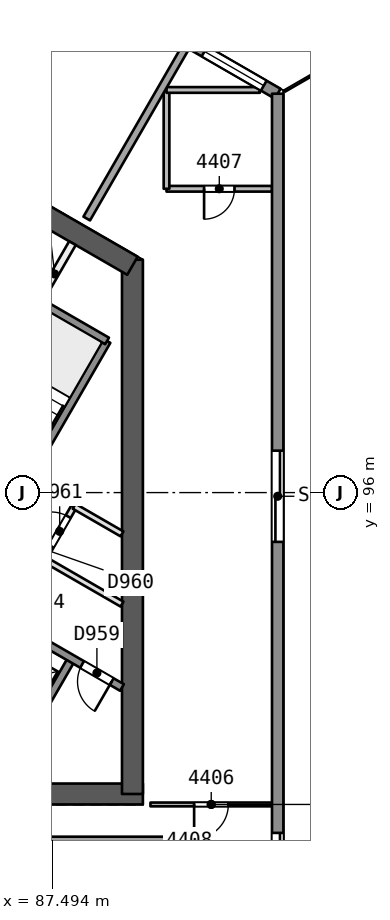
"""IFC4 building model, lengths in metres.
Left out: names, types, materials, properties, quantities, classifications, styles, units other than length and angle.
Written with IfcOpenShell. Run it as: python <this file> out.ifc"""

import sys

from ifc_helpers import new_model, si_unit, direction, frame, frame_2d, origin, place, context, subcontext, project, spatial, rectangle, extrude, element, fill, save


model = new_model("IFC4")
c1 = context("Model", 3, precision=1e-05, world=origin(), true_north=direction((0.0, 1.0)))
c2 = subcontext(c1, "Body", "Model", "MODEL_VIEW")
j1 = project(units=[si_unit("LENGTHUNIT", "METRE"), si_unit("PLANEANGLEUNIT", "RADIAN")], contexts=[c1])
p1 = place(None, origin())
s1 = spatial("IfcSite", under=j1, at=p1, CompositionType="ELEMENT")
p2 = place(p1, origin())
s2 = spatial("IfcBuilding", under=s1, at=p2, CompositionType="ELEMENT")
p3 = place(p2, frame((0.0, 0.0, 182.2)))
s3 = spatial("IfcBuildingStorey", under=s2, at=p3, CompositionType="ELEMENT", Elevation=182.2)
p4 = place(p3, frame((79.659, 88.069, 0.0), z_axis=(0.0, 0.0, 1.0), x_axis=(1.0, 0.0, 0.0)))
e1 = element("IfcWall", 1, at=p4, inside=s3, PredefinedType="SHEAR", context=c2, shape_type="SweptSolid", body=[
    extrude(rectangle(XDim=10.221, YDim=0.55, at=frame_2d((5.111, 0.0))), origin(), (0.0, 0.0, 1.0), 3.7),
])
p5 = place(p4, frame((0.791, 0.0, 0.0)))
e2 = element("IfcOpeningElement", 2, at=p5, cuts=e1, PredefinedType="OPENING", context=c2, shape_type="SweptSolid", body=[
    extrude(rectangle(XDim=1.2, YDim=2.1, at=frame_2d((0.6, 1.05))), frame((0.0, 0.286, 0.0), z_axis=(0.0, -1.0, 0.0), x_axis=(1.0, 0.0, 0.0)), (0.0, 0.0, 1.0), 0.571),
])
p6 = place(p3, frame((89.605, 88.069, 0.0), z_axis=(0.0, 0.0, 1.0), x_axis=(0.0, 1.0, 0.0)))
e3 = element("IfcWall", 3, at=p6, inside=s3, PredefinedType="SHEAR", context=c2, shape_type="SweptSolid", body=[
    extrude(rectangle(XDim=14.058, YDim=0.55, at=frame_2d((7.029, 0.0))), origin(), (0.0, 0.0, 1.0), 3.7),
])
p7 = place(p3, frame((89.605, 101.969, 0.0), z_axis=(0.0, 0.0, 1.0), x_axis=(-0.865997833373, 0.500047750313, 0.0)))
e4 = element("IfcWall", 4, at=p7, inside=s3, PredefinedType="SHEAR", context=c2, shape_type="SweptSolid", body=[
    extrude(rectangle(XDim=3.487, YDim=0.55, at=frame_2d((1.743, 0.0))), origin(), (0.0, 0.0, 1.0), 3.7),
])
p8 = place(p3, frame((93.278, 87.794, 0.0), z_axis=(0.0, 0.0, 1.0), x_axis=(-1.0, 0.0, 0.0)))
e5 = element("IfcWall", 5, at=p8, inside=s3, PredefinedType="PARTITIONING", context=c2, shape_type="SweptSolid", body=[
    extrude(rectangle(XDim=3.199, YDim=0.1, at=frame_2d((1.6, 0.0))), origin(), (0.0, 0.0, 1.0), 3.25),
])
p9 = place(p8, frame((1.15, 0.0, 0.0)))
e6 = element("IfcOpeningElement", 6, at=p9, cuts=e5, PredefinedType="OPENING", context=c2, shape_type="SweptSolid", body=[
    extrude(rectangle(XDim=0.9, YDim=2.1, at=frame_2d((0.45, 1.05))), frame((0.0, 0.061, 0.0), z_axis=(0.0, -1.0, 0.0), x_axis=(1.0, 0.0, 0.0)), (0.0, 0.0, 1.0), 0.121),
])
p10 = place(p3, frame((82.1, 86.846, 0.0), z_axis=(0.0, 0.0, 1.0), x_axis=(1.0, 0.0, 0.0)))
e7 = element("IfcWall", 7, at=p10, inside=s3, PredefinedType="PARTITIONING", context=c2, shape_type="SweptSolid", body=[
    extrude(rectangle(XDim=9.0, YDim=0.2, at=frame_2d((4.5, 0.0))), origin(), (0.0, 0.0, 1.0), 3.25),
])
p11 = place(p3, frame((91.1, 86.846, 0.0), z_axis=(0.0, 0.0, 1.0), x_axis=(0.0, -1.0, 0.0)))
e8 = element("IfcWall", 8, at=p11, inside=s3, PredefinedType="PARTITIONING", context=c2, shape_type="SweptSolid", body=[
    extrude(rectangle(XDim=2.0, YDim=0.2, at=frame_2d((1.0, 0.0))), origin(), (0.0, 0.0, 1.0), 3.25),
])
p12 = place(p11, frame((0.55, 0.0, 0.0)))
e9 = element("IfcOpeningElement", 9, at=p12, cuts=e8, PredefinedType="OPENING", context=c2, shape_type="SweptSolid", body=[
    extrude(rectangle(XDim=0.9, YDim=2.1, at=frame_2d((0.45, 1.05))), frame((0.0, 0.11, 0.0), z_axis=(0.0, -1.0, 0.0), x_axis=(1.0, 0.0, 0.0)), (0.0, 0.0, 1.0), 0.221),
])
p13 = place(p3, frame((93.278, 103.994, 0.0), z_axis=(0.0, 0.0, 1.0), x_axis=(-1.0, 0.0, 0.0)))
e10 = element("IfcWall", 10, at=p13, inside=s3, PredefinedType="PARTITIONING", context=c2, shape_type="SweptSolid", body=[
    extrude(rectangle(XDim=2.777, YDim=0.15, at=frame_2d((1.388, 0.0))), origin(), (0.0, 0.0, 1.0), 3.25),
])
p14 = place(p13, frame((0.988, 0.0, 0.0)))
e11 = element("IfcOpeningElement", 11, at=p14, cuts=e10, PredefinedType="OPENING", context=c2, shape_type="SweptSolid", body=[
    extrude(rectangle(XDim=0.8, YDim=2.1, at=frame_2d((0.4, 1.05))), frame((0.0, 0.085, 0.0), z_axis=(0.0, -1.0, 0.0), x_axis=(1.0, 0.0, 0.0)), (0.0, 0.0, 1.0), 0.171),
])
p15 = place(p3, frame((90.501, 103.994, 0.0), z_axis=(0.0, 0.0, 1.0), x_axis=(0.0, 1.0, 0.0)))
e12 = element("IfcWall", 12, at=p15, inside=s3, PredefinedType="PARTITIONING", context=c2, shape_type="SweptSolid", body=[
    extrude(rectangle(XDim=2.6, YDim=0.15, at=frame_2d((1.3, 0.0))), origin(), (0.0, 0.0, 1.0), 3.25),
])
p16 = place(p3, frame((90.501, 106.594, 0.0), z_axis=(0.0, 0.0, 1.0), x_axis=(1.0, 0.0, 0.0)))
e13 = element("IfcWall", 13, at=p16, inside=s3, PredefinedType="PARTITIONING", context=c2, shape_type="SweptSolid", body=[
    extrude(rectangle(XDim=2.457, YDim=0.15, at=frame_2d((1.229, 0.0))), origin(), (0.0, 0.0, 1.0), 3.25),
])
p17 = place(p3, frame((91.006, 107.721, 0.0), z_axis=(0.0, 0.0, 1.0), x_axis=(-0.500015953014, -0.866016193112, 0.0)))
e14 = element("IfcWall", 14, at=p17, inside=s3, PredefinedType="PARTITIONING", context=c2, shape_type="SweptSolid", body=[
    extrude(rectangle(XDim=5.208, YDim=0.2, at=frame_2d((2.604, 0.0))), origin(), (0.0, 0.0, 1.0), 3.25),
])
p18 = place(p3, frame((88.732, 109.206, 0.0), z_axis=(0.0, 0.0, 1.0), x_axis=(0.866006352826, -0.500032995777, 0.0)))
e15 = element("IfcWall", 15, at=p18, inside=s3, PredefinedType="SOLIDWALL", context=c2, shape_type="SweptSolid", body=[
    extrude(rectangle(XDim=5.422, YDim=0.3, at=frame_2d((2.711, 0.0))), origin(), (0.0, 0.0, 1.0), 3.25),
])
p19 = place(p18, frame((3.198, 0.0, 0.9)))
e16 = element("IfcOpeningElement", 16, at=p19, cuts=e15, PredefinedType="OPENING", context=c2, shape_type="SweptSolid", body=[
    extrude(rectangle(XDim=1.8, YDim=1.5, at=frame_2d((0.9, 0.75))), frame((0.0, 0.161, 0.0), z_axis=(0.0, -1.0, 0.0), x_axis=(1.0, 0.0, 0.0)), (0.0, 0.0, 1.0), 0.321),
])
p20 = place(p18, frame((0.413, 0.0, 0.9)))
e17 = element("IfcOpeningElement", 17, at=p20, cuts=e15, PredefinedType="OPENING", context=c2, shape_type="SweptSolid", body=[
    extrude(rectangle(XDim=1.8, YDim=1.5, at=frame_2d((0.9, 0.75))), frame((0.0, 0.161, 0.0), z_axis=(0.0, -1.0, 0.0), x_axis=(1.0, 0.0, 0.0)), (0.0, 0.0, 1.0), 0.321),
])
p21 = place(p3, frame((93.427, 106.495, 0.0), z_axis=(0.0, 0.0, 1.0), x_axis=(0.0, -1.0, 0.0)))
e18 = element("IfcWall", 18, at=p21, inside=s3, PredefinedType="SOLIDWALL", context=c2, shape_type="SweptSolid", body=[
    extrude(rectangle(XDim=52.991, YDim=0.3, at=frame_2d((26.495, 0.0))), origin(), (0.0, 0.0, 1.0), 3.25),
])
p22 = place(p21, frame((19.45, 0.0, 0.0)))
e19 = element("IfcOpeningElement", 19, at=p22, cuts=e18, PredefinedType="OPENING", context=c2, shape_type="SweptSolid", body=[
    extrude(rectangle(XDim=2.4, YDim=2.4, at=frame_2d((1.2, 1.2))), frame((0.0, 0.161, 0.0), z_axis=(0.0, -1.0, 0.0), x_axis=(1.0, 0.0, 0.0)), (0.0, 0.0, 1.0), 0.321),
])
p23 = place(p21, frame((9.392, 0.0, 0.0)))
e20 = element("IfcOpeningElement", 20, at=p23, cuts=e18, PredefinedType="OPENING", context=c2, shape_type="SweptSolid", body=[
    extrude(rectangle(XDim=2.4, YDim=2.4, at=frame_2d((1.2, 1.2))), frame((0.0, 0.161, 0.0), z_axis=(0.0, -1.0, 0.0), x_axis=(1.0, 0.0, 0.0)), (0.0, 0.0, 1.0), 0.321),
])
p24 = place(p21, frame((40.535, 0.0, 0.0)))
e21 = element("IfcOpeningElement", 21, at=p24, cuts=e18, PredefinedType="OPENING", context=c2, shape_type="SweptSolid", body=[
    extrude(rectangle(XDim=2.4, YDim=2.4, at=frame_2d((1.2, 1.2))), frame((0.0, 0.161, 0.0), z_axis=(0.0, -1.0, 0.0), x_axis=(1.0, 0.0, 0.0)), (0.0, 0.0, 1.0), 0.321),
])
p25 = place(p21, frame((27.544, 0.0, 0.9)))
e22 = element("IfcOpeningElement", 22, at=p25, cuts=e18, PredefinedType="OPENING", context=c2, shape_type="SweptSolid", body=[
    extrude(rectangle(XDim=1.8, YDim=1.5, at=frame_2d((0.9, 0.75))), frame((0.0, 0.161, 0.0), z_axis=(0.0, -1.0, 0.0), x_axis=(1.0, 0.0, 0.0)), (0.0, 0.0, 1.0), 0.321),
])
p26 = place(p21, frame((23.647, 0.0, 0.9)))
e23 = element("IfcOpeningElement", 23, at=p26, cuts=e18, PredefinedType="OPENING", context=c2, shape_type="SweptSolid", body=[
    extrude(rectangle(XDim=1.8, YDim=1.5, at=frame_2d((0.9, 0.75))), frame((0.0, 0.161, 0.0), z_axis=(0.0, -1.0, 0.0), x_axis=(1.0, 0.0, 0.0)), (0.0, 0.0, 1.0), 0.321),
])
p27 = place(p3, frame((42.841, 82.711, 0.0), z_axis=(0.0, 0.0, 1.0), x_axis=(0.866024774967, 0.500001089142, 0.0)))
e24 = element("IfcWall", 24, at=p27, inside=s3, PredefinedType="SOLIDWALL", context=c2, shape_type="SweptSolid", body=[
    extrude(rectangle(XDim=52.991, YDim=0.3, at=frame_2d((26.496, 0.0))), origin(), (0.0, 0.0, 1.0), 3.25),
])
p28 = place(p27, frame((20.619, 0.0, 0.0)))
e25 = element("IfcOpeningElement", 25, at=p28, cuts=e24, PredefinedType="OPENING", context=c2, shape_type="SweptSolid", body=[
    extrude(rectangle(XDim=2.4, YDim=2.4, at=frame_2d((1.2, 1.2))), frame((0.0, 0.161, 0.0), z_axis=(0.0, -1.0, 0.0), x_axis=(1.0, 0.0, 0.0)), (0.0, 0.0, 1.0), 0.321),
])
p29 = place(p27, frame((9.392, 0.0, 0.0)))
e26 = element("IfcOpeningElement", 26, at=p29, cuts=e24, PredefinedType="OPENING", context=c2, shape_type="SweptSolid", body=[
    extrude(rectangle(XDim=2.4, YDim=2.4, at=frame_2d((1.2, 1.2))), frame((0.0, 0.161, 0.0), z_axis=(0.0, -1.0, 0.0), x_axis=(1.0, 0.0, 0.0)), (0.0, 0.0, 1.0), 0.321),
])
p30 = place(p27, frame((40.145, 0.0, 0.0)))
e27 = element("IfcOpeningElement", 27, at=p30, cuts=e24, PredefinedType="OPENING", context=c2, shape_type="SweptSolid", body=[
    extrude(rectangle(XDim=2.4, YDim=2.4, at=frame_2d((1.2, 1.2))), frame((0.0, 0.161, 0.0), z_axis=(0.0, -1.0, 0.0), x_axis=(1.0, 0.0, 0.0)), (0.0, 0.0, 1.0), 0.321),
])
p31 = place(p27, frame((26.375, 0.0, 0.9)))
e28 = element("IfcOpeningElement", 28, at=p31, cuts=e24, PredefinedType="OPENING", context=c2, shape_type="SweptSolid", body=[
    extrude(rectangle(XDim=1.8, YDim=1.5, at=frame_2d((0.9, 0.75))), frame((0.0, 0.161, 0.0), z_axis=(0.0, -1.0, 0.0), x_axis=(1.0, 0.0, 0.0)), (0.0, 0.0, 1.0), 0.321),
])
p32 = place(p3, frame((86.77, 89.486, 0.0), z_axis=(0.0, 0.0, 1.0), x_axis=(0.499961042966, 0.86604789447, 0.0)))
e29 = element("IfcWall", 29, at=p32, inside=s3, PredefinedType="SOLIDWALL", context=c2, shape_type="SweptSolid", body=[
    extrude(rectangle(XDim=2.48, YDim=0.2, at=frame_2d((1.24, 0.0))), origin(), (0.0, 0.0, 1.0), 3.25),
])
p33 = place(p3, frame((87.271, 94.254, 0.0), z_axis=(0.0, 0.0, 1.0), x_axis=(0.499995408039, 0.866028054938, 0.0)))
e30 = element("IfcWall", 30, at=p33, inside=s3, PredefinedType="PARTITIONING", context=c2, shape_type="SweptSolid", body=[
    extrude(rectangle(XDim=1.6, YDim=0.15, at=frame_2d((0.8, 0.0))), origin(), (0.0, 0.0, 1.0), 3.25),
])
p34 = place(p33, frame((0.387, 0.0, 0.0)))
e31 = element("IfcOpeningElement", 31, at=p34, cuts=e30, PredefinedType="OPENING", context=c2, shape_type="SweptSolid", body=[
    extrude(rectangle(XDim=0.9, YDim=2.1, at=frame_2d((0.45, 1.05))), frame((0.0, 0.085, 0.0), z_axis=(0.0, -1.0, 0.0), x_axis=(1.0, 0.0, 0.0)), (0.0, 0.0, 1.0), 0.171),
])
p35 = place(p3, frame((85.087, 93.321, 0.0), z_axis=(0.0, 0.0, 1.0), x_axis=(0.500019787375, 0.866013979237, 0.0)))
e32 = element("IfcWall", 32, at=p35, inside=s3, PredefinedType="SOLIDWALL", context=c2, shape_type="SweptSolid", body=[
    extrude(rectangle(XDim=7.7, YDim=0.2, at=frame_2d((3.85, 0.0))), origin(), (0.0, 0.0, 1.0), 3.25),
])
p36 = place(p3, frame((87.09, 100.94, 0.0), z_axis=(0.0, 0.0, 1.0), x_axis=(0.499951854219, 0.86605319898, 0.0)))
e33 = element("IfcWall", 33, at=p36, inside=s3, PredefinedType="PARTITIONING", context=c2, shape_type="SweptSolid", body=[
    extrude(rectangle(XDim=1.873, YDim=0.2, at=frame_2d((0.937, 0.0))), origin(), (0.0, 0.0, 1.0), 3.25),
])
p37 = place(p3, frame((89.33, 90.872, 0.0), z_axis=(0.0, 0.0, 1.0), x_axis=(-0.866027589512, 0.49999621419, 0.0)))
e34 = element("IfcWall", 34, at=p37, inside=s3, PredefinedType="SOLIDWALL", context=c2, shape_type="SweptSolid", body=[
    extrude(rectangle(XDim=10.524, YDim=0.2, at=frame_2d((5.262, 0.0))), origin(), (0.0, 0.0, 1.0), 3.25),
])
p38 = place(p37, frame((0.312, 0.0, 0.0)))
e35 = element("IfcOpeningElement", 35, at=p38, cuts=e34, PredefinedType="OPENING", context=c2, shape_type="SweptSolid", body=[
    extrude(rectangle(XDim=0.9, YDim=2.1, at=frame_2d((0.45, 1.05))), frame((0.0, 0.11, 0.0), z_axis=(0.0, -1.0, 0.0), x_axis=(1.0, 0.0, 0.0)), (0.0, 0.0, 1.0), 0.221),
])
p39 = place(p3, frame((89.33, 93.065, 0.0), z_axis=(0.0, 0.0, 1.0), x_axis=(-0.866041951395, 0.499971337603, 0.0)))
e36 = element("IfcWall", 36, at=p39, inside=s3, PredefinedType="PARTITIONING", context=c2, shape_type="SweptSolid", body=[
    extrude(rectangle(XDim=2.378, YDim=0.15, at=frame_2d((1.189, 0.0))), origin(), (0.0, 0.0, 1.0), 3.25),
])
p40 = place(p3, frame((89.33, 94.913, 0.0), z_axis=(0.0, 0.0, 1.0), x_axis=(-0.865981433661, 0.500076150755, 0.0)))
e37 = element("IfcWall", 37, at=p40, inside=s3, PredefinedType="PARTITIONING", context=c2, shape_type="SweptSolid", body=[
    extrude(rectangle(XDim=1.454, YDim=0.15, at=frame_2d((0.727, 0.0))), origin(), (0.0, 0.0, 1.0), 3.25),
])
p41 = place(p3, frame((88.937, 99.99, 0.0), z_axis=(0.0, 0.0, 1.0), x_axis=(-0.866004344652, 0.500036473714, 0.0)))
e38 = element("IfcWall", 38, at=p41, inside=s3, PredefinedType="SOLIDWALL", context=c2, shape_type="SweptSolid", body=[
    extrude(rectangle(XDim=4.15, YDim=0.2, at=frame_2d((2.075, 0.0))), origin(), (0.0, 0.0, 1.0), 3.25),
])
p42 = place(p9, origin())
e39 = element("IfcDoor", 39, at=p42, inside=s3, OperationType="SINGLE_SWING_RIGHT", PredefinedType="NOTDEFINED", context=c2, shape_type="SweptSolid", body=[
    extrude(rectangle(XDim=0.9, YDim=2.1, at=frame_2d((0.45, 1.05))), frame((0.0, 0.025, 0.0), z_axis=(0.0, -1.0, 0.0), x_axis=(1.0, 0.0, 0.0)), (0.0, 0.0, 1.0), 0.05),
])
fill(e6, e39)
p43 = place(p14, origin())
e40 = element("IfcDoor", 40, at=p43, inside=s3, OperationType="SINGLE_SWING_RIGHT", PredefinedType="NOTDEFINED", context=c2, shape_type="SweptSolid", body=[
    extrude(rectangle(XDim=0.8, YDim=2.1, at=frame_2d((0.4, 1.05))), frame((0.0, 0.025, 0.0), z_axis=(0.0, -1.0, 0.0), x_axis=(1.0, 0.0, 0.0)), (0.0, 0.0, 1.0), 0.05),
])
fill(e11, e40)
p44 = place(p19, origin())
e41 = element("IfcWindow", 41, at=p44, inside=s3, PartitioningType="SINGLE_PANEL", PredefinedType="WINDOW", context=c2, shape_type="SweptSolid", body=[
    extrude(rectangle(XDim=1.8, YDim=1.5, at=frame_2d((0.9, 0.75))), frame((0.0, 0.03, 0.0), z_axis=(0.0, -1.0, 0.0), x_axis=(1.0, 0.0, 0.0)), (0.0, 0.0, 1.0), 0.06),
])
fill(e16, e41)
p45 = place(p22, origin())
e42 = element("IfcDoor", 42, at=p45, inside=s3, OperationType="SLIDING_TO_LEFT", PredefinedType="NOTDEFINED", context=c2, shape_type="SweptSolid", body=[
    extrude(rectangle(XDim=2.4, YDim=2.4, at=frame_2d((1.2, 1.2))), frame((0.0, 0.025, 0.0), z_axis=(0.0, -1.0, 0.0), x_axis=(1.0, 0.0, 0.0)), (0.0, 0.0, 1.0), 0.05),
])
fill(e19, e42)
p46 = place(p23, origin())
e43 = element("IfcDoor", 43, at=p46, inside=s3, OperationType="SLIDING_TO_RIGHT", PredefinedType="NOTDEFINED", context=c2, shape_type="SweptSolid", body=[
    extrude(rectangle(XDim=2.4, YDim=2.4, at=frame_2d((1.2, 1.2))), frame((0.0, 0.025, 0.0), z_axis=(0.0, -1.0, 0.0), x_axis=(1.0, 0.0, 0.0)), (0.0, 0.0, 1.0), 0.05),
])
fill(e20, e43)
p47 = place(p38, origin())
e44 = element("IfcDoor", 44, at=p47, inside=s3, OperationType="SINGLE_SWING_LEFT", PredefinedType="NOTDEFINED", context=c2, shape_type="SweptSolid", body=[
    extrude(rectangle(XDim=0.9, YDim=2.1, at=frame_2d((0.45, 1.05))), frame((0.0, 0.025, 0.0), z_axis=(0.0, -1.0, 0.0), x_axis=(1.0, 0.0, 0.0)), (0.0, 0.0, 1.0), 0.05),
])
fill(e35, e44)
p48 = place(p34, origin())
e45 = element("IfcDoor", 45, at=p48, inside=s3, OperationType="SINGLE_SWING_LEFT", PredefinedType="NOTDEFINED", context=c2, shape_type="SweptSolid", body=[
    extrude(rectangle(XDim=0.9, YDim=2.1, at=frame_2d((0.45, 1.05))), frame((0.0, 0.025, 0.0), z_axis=(0.0, -1.0, 0.0), x_axis=(1.0, 0.0, 0.0)), (0.0, 0.0, 1.0), 0.05),
])
fill(e31, e45)
save(model, sys.argv[1])
